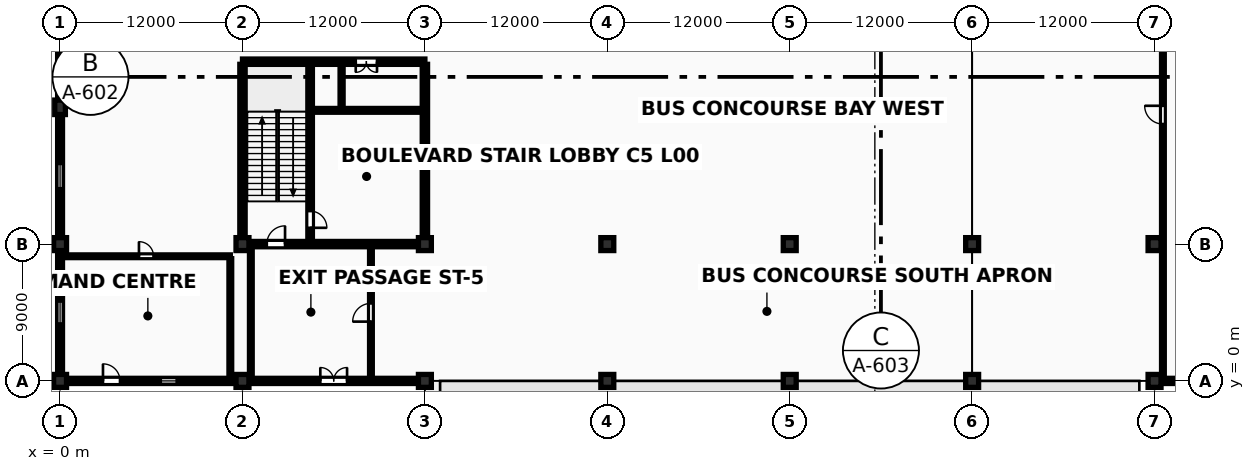
"""IFC4 building model, lengths in metres.
Left out: names, types, materials, properties, quantities, classifications, styles, units other than length and angle.
Written with IfcOpenShell. Run it as: python <this file> out.ifc"""

import sys

from ifc_helpers import new_model, si_unit, direction, frame, frame_2d, origin, origin_2d, place, context, subcontext, project, spatial, rectangle, circle, extrude, element, fill, save


model = new_model("IFC4")
c1 = context("Model", 3, precision=1e-05, world=origin(), true_north=direction((0.0, 1.0)))
c2 = subcontext(c1, "Body", "Model", "MODEL_VIEW")
j1 = project(units=[si_unit("LENGTHUNIT", "METRE"), si_unit("PLANEANGLEUNIT", "RADIAN")], contexts=[c1])
p1 = place(None, origin())
s1 = spatial("IfcSite", under=j1, at=p1, CompositionType="ELEMENT")
p2 = place(p1, origin())
s2 = spatial("IfcBuilding", under=s1, at=p2, CompositionType="ELEMENT")
p3 = place(p2, origin())
s3 = spatial("IfcBuildingStorey", under=s2, at=p3, CompositionType="ELEMENT", Elevation=0.0)
for number, where, z_axis, x_axis in (
    (1, (0.0, 0.0, 0.0), (0.0, 0.0, 1.0), (1.0, 0.0, 0.0)),
    (2, (0.0, 9.0, 0.0), (0.0, 0.0, 1.0), (1.0, 0.0, 0.0)),
):
    element("IfcColumn", number, at=place(p3, frame(where, z_axis=z_axis, x_axis=x_axis)), inside=s3, PredefinedType="COLUMN", context=c2, shape_type="SweptSolid", body=[
        extrude(rectangle(XDim=0.85, YDim=0.85, at=origin_2d()), origin(), (0.0, 0.0, 1.0), 5.4),
    ])
p4 = place(p3, frame((12.0, 0.0, 0.0), z_axis=(0.0, 0.0, 1.0), x_axis=(1.0, 0.0, 0.0)))
e3 = element("IfcColumn", 3, at=p4, inside=s3, PredefinedType="COLUMN", context=c2, shape_type="SweptSolid", body=[
    extrude(circle(Radius=0.425, at=origin_2d()), origin(), (0.0, 0.0, 1.0), 5.4),
])
p5 = place(p3, frame((12.0, 9.0, 0.0), z_axis=(0.0, 0.0, 1.0), x_axis=(1.0, 0.0, 0.0)))
e4 = element("IfcColumn", 4, at=p5, inside=s3, PredefinedType="COLUMN", context=c2, shape_type="SweptSolid", body=[
    extrude(rectangle(XDim=0.85, YDim=0.85, at=origin_2d()), origin(), (0.0, 0.0, 1.0), 5.4),
])
p6 = place(p3, frame((24.0, 0.0, 0.0), z_axis=(0.0, 0.0, 1.0), x_axis=(1.0, 0.0, 0.0)))
e5 = element("IfcColumn", 5, at=p6, inside=s3, PredefinedType="COLUMN", context=c2, shape_type="SweptSolid", body=[
    extrude(circle(Radius=0.425, at=origin_2d()), origin(), (0.0, 0.0, 1.0), 5.4),
])
p7 = place(p3, frame((24.0, 9.0, 0.0), z_axis=(0.0, 0.0, 1.0), x_axis=(1.0, 0.0, 0.0)))
e6 = element("IfcColumn", 6, at=p7, inside=s3, PredefinedType="COLUMN", context=c2, shape_type="SweptSolid", body=[
    extrude(rectangle(XDim=0.85, YDim=0.85, at=origin_2d()), origin(), (0.0, 0.0, 1.0), 5.4),
])
p8 = place(p3, frame((36.0, 0.0, 0.0), z_axis=(0.0, 0.0, 1.0), x_axis=(1.0, 0.0, 0.0)))
e7 = element("IfcColumn", 7, at=p8, inside=s3, PredefinedType="COLUMN", context=c2, shape_type="SweptSolid", body=[
    extrude(circle(Radius=0.425, at=origin_2d()), origin(), (0.0, 0.0, 1.0), 5.4),
])
p9 = place(p3, frame((36.0, 9.0, 0.0), z_axis=(0.0, 0.0, 1.0), x_axis=(1.0, 0.0, 0.0)))
e8 = element("IfcColumn", 8, at=p9, inside=s3, PredefinedType="COLUMN", context=c2, shape_type="SweptSolid", body=[
    extrude(rectangle(XDim=0.85, YDim=0.85, at=origin_2d()), origin(), (0.0, 0.0, 1.0), 5.4),
])
p10 = place(p3, frame((48.0, 0.0, 0.0), z_axis=(0.0, 0.0, 1.0), x_axis=(1.0, 0.0, 0.0)))
e9 = element("IfcColumn", 9, at=p10, inside=s3, PredefinedType="COLUMN", context=c2, shape_type="SweptSolid", body=[
    extrude(circle(Radius=0.425, at=origin_2d()), origin(), (0.0, 0.0, 1.0), 5.4),
])
p11 = place(p3, frame((48.0, 9.0, 0.0), z_axis=(0.0, 0.0, 1.0), x_axis=(1.0, 0.0, 0.0)))
e10 = element("IfcColumn", 10, at=p11, inside=s3, PredefinedType="COLUMN", context=c2, shape_type="SweptSolid", body=[
    extrude(rectangle(XDim=0.85, YDim=0.85, at=origin_2d()), origin(), (0.0, 0.0, 1.0), 5.4),
])
p12 = place(p3, frame((60.0, 0.0, 0.0), z_axis=(0.0, 0.0, 1.0), x_axis=(1.0, 0.0, 0.0)))
e11 = element("IfcColumn", 11, at=p12, inside=s3, PredefinedType="COLUMN", context=c2, shape_type="SweptSolid", body=[
    extrude(circle(Radius=0.425, at=origin_2d()), origin(), (0.0, 0.0, 1.0), 5.4),
])
p13 = place(p3, frame((60.0, 9.0, 0.0), z_axis=(0.0, 0.0, 1.0), x_axis=(1.0, 0.0, 0.0)))
e12 = element("IfcColumn", 12, at=p13, inside=s3, PredefinedType="COLUMN", context=c2, shape_type="SweptSolid", body=[
    extrude(rectangle(XDim=0.85, YDim=0.85, at=origin_2d()), origin(), (0.0, 0.0, 1.0), 5.4),
])
p14 = place(p3, frame((72.0, 0.0, 0.0), z_axis=(0.0, 0.0, 1.0), x_axis=(1.0, 0.0, 0.0)))
e13 = element("IfcColumn", 13, at=p14, inside=s3, PredefinedType="COLUMN", context=c2, shape_type="SweptSolid", body=[
    extrude(circle(Radius=0.425, at=origin_2d()), origin(), (0.0, 0.0, 1.0), 5.4),
])
p15 = place(p3, frame((72.0, 9.0, 0.0), z_axis=(0.0, 0.0, 1.0), x_axis=(1.0, 0.0, 0.0)))
e14 = element("IfcColumn", 14, at=p15, inside=s3, PredefinedType="COLUMN", context=c2, shape_type="SweptSolid", body=[
    extrude(rectangle(XDim=0.85, YDim=0.85, at=origin_2d()), origin(), (0.0, 0.0, 1.0), 5.4),
])
p16 = place(p3, frame((0.0, 18.0, 0.0), z_axis=(0.0, 0.0, 1.0), x_axis=(1.0, 0.0, 0.0)))
e15 = element("IfcColumn", 15, at=p16, inside=s3, PredefinedType="PILASTER", context=c2, shape_type="SweptSolid", body=[
    extrude(rectangle(XDim=0.7, YDim=0.95, at=origin_2d()), origin(), (0.0, 0.0, 1.0), 5.4),
])
p17 = place(p3, frame((12.422, 9.0, 0.0), z_axis=(0.0, 0.0, 1.0), x_axis=(1.0, 0.0, 0.0)))
e16 = element("IfcWall", 16, at=p17, inside=s3, PredefinedType="SHEAR", context=c2, shape_type="SweptSolid", body=[
    extrude(rectangle(XDim=11.156, YDim=0.35, at=frame_2d((5.578, 0.0))), origin(), (0.0, 0.0, 1.0), 5.203),
])
p18 = place(p17, frame((1.178, 0.0, 0.0)))
e17 = element("IfcOpeningElement", 17, at=p18, cuts=e16, PredefinedType="OPENING", context=c2, shape_type="SweptSolid", body=[
    extrude(rectangle(XDim=1.2, YDim=2.2, at=frame_2d((0.6, 1.1))), frame((0.0, 0.19, 0.0), z_axis=(0.0, -1.0, 0.0), x_axis=(1.0, 0.0, 0.0)), (0.0, 0.0, 1.0), 0.38),
])
p19 = place(p3, frame((12.0, 21.0, 0.0), z_axis=(0.0, 0.0, 1.0), x_axis=(1.0, 0.0, 0.0)))
e18 = element("IfcWall", 18, at=p19, inside=s3, PredefinedType="SHEAR", context=c2, shape_type="SweptSolid", body=[
    extrude(rectangle(XDim=12.0, YDim=0.35, at=frame_2d((6.0, 0.0))), origin(), (0.0, 0.0, 1.0), 5.203),
])
p20 = place(p19, frame((7.45, 0.0, 0.0)))
e19 = element("IfcOpeningElement", 19, at=p20, cuts=e18, PredefinedType="OPENING", context=c2, shape_type="SweptSolid", body=[
    extrude(rectangle(XDim=1.4, YDim=2.22, at=frame_2d((0.7, 1.11))), frame((0.0, 0.19, 0.0), z_axis=(0.0, -1.0, 0.0), x_axis=(1.0, 0.0, 0.0)), (0.0, 0.0, 1.0), 0.38),
])
for number, where, z_axis, x_axis in (
    (20, (12.0, 9.422, 0.0), (0.0, 0.0, 1.0), (0.0, 1.0, 0.0)),
    (21, (24.0, 9.422, 0.0), (0.0, 0.0, 1.0), (0.0, 1.0, 0.0)),
):
    element("IfcWall", number, at=place(p3, frame(where, z_axis=z_axis, x_axis=x_axis)), inside=s3, PredefinedType="SHEAR", context=c2, shape_type="SweptSolid", body=[
        extrude(rectangle(XDim=11.406, YDim=0.35, at=frame_2d((5.703, 0.0))), origin(), (0.0, 0.0, 1.0), 5.203),
    ])
p21 = place(p3, frame((16.45, 9.172, 0.0), z_axis=(0.0, 0.0, 1.0), x_axis=(0.0, 1.0, 0.0)))
e22 = element("IfcWall", 22, at=p21, inside=s3, PredefinedType="SHEAR", context=c2, shape_type="SweptSolid", body=[
    extrude(rectangle(XDim=11.656, YDim=0.3, at=frame_2d((5.828, 0.0))), origin(), (0.0, 0.0, 1.0), 5.203),
])
p22 = place(p21, frame((0.9, 0.0, 0.0)))
e23 = element("IfcOpeningElement", 23, at=p22, cuts=e22, PredefinedType="OPENING", context=c2, shape_type="SweptSolid", body=[
    extrude(rectangle(XDim=1.1, YDim=2.2, at=frame_2d((0.55, 1.1))), frame((0.0, 0.165, 0.0), z_axis=(0.0, -1.0, 0.0), x_axis=(1.0, 0.0, 0.0)), (0.0, 0.0, 1.0), 0.33),
])
p23 = place(p3, frame((16.597, 17.8, 0.0), z_axis=(0.0, 0.0, 1.0), x_axis=(1.0, 0.0, 0.0)))
e24 = element("IfcWall", 24, at=p23, inside=s3, PredefinedType="SOLIDWALL", context=c2, shape_type="SweptSolid", body=[
    extrude(rectangle(XDim=7.231, YDim=0.25, at=frame_2d((3.615, 0.0))), origin(), (0.0, 0.0, 1.0), 5.203),
])
p24 = place(p3, frame((18.52, 17.92, 0.0), z_axis=(0.0, 0.0, 1.0), x_axis=(0.0, 1.0, 0.0)))
e25 = element("IfcWall", 25, at=p24, inside=s3, PredefinedType="SOLIDWALL", context=c2, shape_type="SweptSolid", body=[
    extrude(rectangle(XDim=2.905, YDim=0.2, at=frame_2d((1.453, 0.0))), origin(), (0.0, 0.0, 1.0), 5.193),
])
p25 = place(p3, frame((0.423, 0.0, 0.0), z_axis=(0.0, 0.0, 1.0), x_axis=(1.0, 0.0, 0.0)))
e26 = element("IfcWall", 26, at=p25, inside=s3, PredefinedType="SOLIDWALL", context=c2, shape_type="SweptSolid", body=[
    extrude(rectangle(XDim=11.154, YDim=0.34, at=frame_2d((5.577, 0.0))), origin(), (0.0, 0.0, 1.0), 3.85),
])
p26 = place(p25, frame((2.4, 0.0, 0.0)))
e27 = element("IfcOpeningElement", 27, at=p26, cuts=e26, PredefinedType="OPENING", context=c2, shape_type="SweptSolid", body=[
    extrude(rectangle(XDim=1.12, YDim=2.18, at=frame_2d((0.56, 1.09))), frame((0.0, 0.185, 0.0), z_axis=(0.0, -1.0, 0.0), x_axis=(1.0, 0.0, 0.0)), (0.0, 0.0, 1.0), 0.37),
])
p27 = place(p25, frame((6.2, 0.0, 0.95)))
e28 = element("IfcOpeningElement", 28, at=p27, cuts=e26, PredefinedType="OPENING", context=c2, shape_type="SweptSolid", body=[
    extrude(rectangle(XDim=1.05, YDim=1.25, at=frame_2d((0.525, 0.625))), frame((0.0, 0.185, 0.0), z_axis=(0.0, -1.0, 0.0), x_axis=(1.0, 0.0, 0.0)), (0.0, 0.0, 1.0), 0.37),
])
p28 = place(p3, frame((12.423, 0.0, 0.0), z_axis=(0.0, 0.0, 1.0), x_axis=(1.0, 0.0, 0.0)))
e29 = element("IfcWall", 29, at=p28, inside=s3, PredefinedType="SOLIDWALL", context=c2, shape_type="SweptSolid", body=[
    extrude(rectangle(XDim=11.154, YDim=0.34, at=frame_2d((5.577, 0.0))), origin(), (0.0, 0.0, 1.0), 3.85),
])
p29 = place(p28, frame((4.697, 0.0, 0.0)))
e30 = element("IfcOpeningElement", 30, at=p29, cuts=e29, PredefinedType="OPENING", context=c2, shape_type="SweptSolid", body=[
    extrude(rectangle(XDim=1.76, YDim=2.36, at=frame_2d((0.88, 1.18))), frame((0.0, 0.185, 0.0), z_axis=(0.0, -1.0, 0.0), x_axis=(1.0, 0.0, 0.0)), (0.0, 0.0, 1.0), 0.37),
])
p30 = place(p3, frame((72.423, 0.0, 0.0), z_axis=(0.0, 0.0, 1.0), x_axis=(1.0, 0.0, 0.0)))
e31 = element("IfcWall", 31, at=p30, inside=s3, PredefinedType="SOLIDWALL", context=c2, shape_type="SweptSolid", body=[
    extrude(rectangle(XDim=11.154, YDim=0.34, at=frame_2d((5.577, 0.0))), origin(), (0.0, 0.0, 1.0), 3.85),
])
p31 = place(p30, frame((4.697, 0.0, 0.0)))
e32 = element("IfcOpeningElement", 32, at=p31, cuts=e31, PredefinedType="OPENING", context=c2, shape_type="SweptSolid", body=[
    extrude(rectangle(XDim=1.76, YDim=2.36, at=frame_2d((0.88, 1.18))), frame((0.0, 0.185, 0.0), z_axis=(0.0, -1.0, 0.0), x_axis=(1.0, 0.0, 0.0)), (0.0, 0.0, 1.0), 0.37),
])
p32 = place(p3, frame((0.0, 0.423, 0.0), z_axis=(0.0, 0.0, 1.0), x_axis=(0.0, 1.0, 0.0)))
e33 = element("IfcWall", 33, at=p32, inside=s3, PredefinedType="SOLIDWALL", context=c2, shape_type="SweptSolid", body=[
    extrude(rectangle(XDim=8.154, YDim=0.32, at=frame_2d((4.077, 0.0))), origin(), (0.0, 0.0, 1.0), 3.85),
])
p33 = place(p32, frame((3.352, 0.0, 0.55)))
e34 = element("IfcOpeningElement", 34, at=p33, cuts=e33, PredefinedType="OPENING", context=c2, shape_type="SweptSolid", body=[
    extrude(rectangle(XDim=1.45, YDim=1.25, at=frame_2d((0.725, 0.625))), frame((0.0, 0.175, 0.0), z_axis=(0.0, -1.0, 0.0), x_axis=(1.0, 0.0, 0.0)), (0.0, 0.0, 1.0), 0.35),
])
p34 = place(p3, frame((0.0, 9.423, 0.0), z_axis=(0.0, 0.0, 1.0), x_axis=(0.0, 1.0, 0.0)))
e35 = element("IfcWall", 35, at=p34, inside=s3, PredefinedType="SOLIDWALL", context=c2, shape_type="SweptSolid", body=[
    extrude(rectangle(XDim=8.104, YDim=0.32, at=frame_2d((4.052, 0.0))), origin(), (0.0, 0.0, 1.0), 3.85),
])
p35 = place(p34, frame((3.252, 0.0, 0.55)))
e36 = element("IfcOpeningElement", 36, at=p35, cuts=e35, PredefinedType="OPENING", context=c2, shape_type="SweptSolid", body=[
    extrude(rectangle(XDim=1.6, YDim=1.25, at=frame_2d((0.8, 0.625))), frame((0.0, 0.175, 0.0), z_axis=(0.0, -1.0, 0.0), x_axis=(1.0, 0.0, 0.0)), (0.0, 0.0, 1.0), 0.35),
])
p36 = place(p3, frame((0.0, 18.473, 0.0), z_axis=(0.0, 0.0, 1.0), x_axis=(0.0, 1.0, 0.0)))
e37 = element("IfcWall", 37, at=p36, inside=s3, PredefinedType="SOLIDWALL", context=c2, shape_type="SweptSolid", body=[
    extrude(rectangle(XDim=8.104, YDim=0.32, at=frame_2d((4.052, 0.0))), origin(), (0.0, 0.0, 1.0), 3.85),
])
p37 = place(p36, frame((3.177, 0.0, 0.55)))
e38 = element("IfcOpeningElement", 38, at=p37, cuts=e37, PredefinedType="OPENING", context=c2, shape_type="SweptSolid", body=[
    extrude(rectangle(XDim=1.75, YDim=1.25, at=frame_2d((0.875, 0.625))), frame((0.0, 0.175, 0.0), z_axis=(0.0, -1.0, 0.0), x_axis=(1.0, 0.0, 0.0)), (0.0, 0.0, 1.0), 0.35),
])
p38 = place(p3, frame((0.14, 8.2, 0.0), z_axis=(0.0, 0.0, 1.0), x_axis=(1.0, 0.0, 0.0)))
e39 = element("IfcWall", 39, at=p38, inside=s3, PredefinedType="SOLIDWALL", context=c2, shape_type="SweptSolid", body=[
    extrude(rectangle(XDim=11.06, YDim=0.18, at=frame_2d((5.53, 0.0))), origin(), (0.0, 0.0, 1.0), 2.75),
])
p39 = place(p38, frame((5.05, 0.0, 0.0)))
e40 = element("IfcOpeningElement", 40, at=p39, cuts=e39, PredefinedType="OPENING", context=c2, shape_type="SweptSolid", body=[
    extrude(rectangle(XDim=0.96, YDim=2.12, at=frame_2d((0.48, 1.06))), frame((0.0, 0.105, 0.0), z_axis=(0.0, -1.0, 0.0), x_axis=(1.0, 0.0, 0.0)), (0.0, 0.0, 1.0), 0.21),
])
p40 = place(p3, frame((11.2, 0.14, 0.0), z_axis=(0.0, 0.0, 1.0), x_axis=(0.0, 1.0, 0.0)))
e41 = element("IfcWall", 41, at=p40, inside=s3, PredefinedType="SOLIDWALL", context=c2, shape_type="SweptSolid", body=[
    extrude(rectangle(XDim=7.9, YDim=0.18, at=frame_2d((3.95, 0.0))), origin(), (0.0, 0.0, 1.0), 2.75),
])
p41 = place(p3, frame((72.55, 0.4, 0.0), z_axis=(0.0, 0.0, 1.0), x_axis=(0.0, 1.0, 0.0)))
e42 = element("IfcWall", 42, at=p41, inside=s3, PredefinedType="SOLIDWALL", context=c2, shape_type="SweptSolid", body=[
    extrude(rectangle(XDim=26.3, YDim=0.18, at=frame_2d((13.15, 0.0))), origin(), (0.0, 0.0, 1.0), 2.6),
])
p42 = place(p41, frame((16.5, 0.0, 0.0)))
e43 = element("IfcOpeningElement", 43, at=p42, cuts=e42, PredefinedType="OPENING", context=c2, shape_type="SweptSolid", body=[
    extrude(rectangle(XDim=1.2, YDim=2.2, at=frame_2d((0.6, 1.1))), frame((0.0, 0.105, 0.0), z_axis=(0.0, -1.0, 0.0), x_axis=(1.0, 0.0, 0.0)), (0.0, 0.0, 1.0), 0.21),
])
p43 = place(p3, frame((12.55, 0.4, 0.0), z_axis=(0.0, 0.0, 1.0), x_axis=(0.0, 1.0, 0.0)))
e44 = element("IfcWall", 44, at=p43, inside=s3, PredefinedType="SOLIDWALL", context=c2, shape_type="SweptSolid", body=[
    extrude(rectangle(XDim=8.3, YDim=0.18, at=frame_2d((4.15, 0.0))), origin(), (0.0, 0.0, 1.0), 2.6),
])
p44 = place(p3, frame((20.45, 0.4, 0.0), z_axis=(0.0, 0.0, 1.0), x_axis=(0.0, 1.0, 0.0)))
e45 = element("IfcWall", 45, at=p44, inside=s3, PredefinedType="SOLIDWALL", context=c2, shape_type="SweptSolid", body=[
    extrude(rectangle(XDim=8.3, YDim=0.18, at=frame_2d((4.15, 0.0))), origin(), (0.0, 0.0, 1.0), 2.6),
])
p45 = place(p44, frame((3.5, 0.0, 0.0)))
e46 = element("IfcOpeningElement", 46, at=p45, cuts=e45, PredefinedType="OPENING", context=c2, shape_type="SweptSolid", body=[
    extrude(rectangle(XDim=1.2, YDim=2.2, at=frame_2d((0.6, 1.1))), frame((0.0, 0.105, 0.0), z_axis=(0.0, -1.0, 0.0), x_axis=(1.0, 0.0, 0.0)), (0.0, 0.0, 1.0), 0.21),
])
p46 = place(p26, frame((1.12, 0.0, 0.0), z_axis=(0.0, 0.0, 1.0), x_axis=(-1.0, 0.0, 0.0)))
e47 = element("IfcDoor", 47, at=p46, inside=s3, OperationType="SINGLE_SWING_LEFT", PredefinedType="DOOR", context=c2, shape_type="SweptSolid", body=[
    extrude(rectangle(XDim=1.12, YDim=2.18, at=frame_2d((0.56, 1.09))), frame((0.0, 0.025, 0.0), z_axis=(0.0, -1.0, 0.0), x_axis=(1.0, 0.0, 0.0)), (0.0, 0.0, 1.0), 0.05),
])
fill(e27, e47)
p47 = place(p27, origin())
e48 = element("IfcWindow", 48, at=p47, inside=s3, PartitioningType="SINGLE_PANEL", PredefinedType="WINDOW", context=c2, shape_type="SweptSolid", body=[
    extrude(rectangle(XDim=1.05, YDim=1.25, at=frame_2d((0.525, 0.625))), frame((0.0, 0.03, 0.0), z_axis=(0.0, -1.0, 0.0), x_axis=(1.0, 0.0, 0.0)), (0.0, 0.0, 1.0), 0.06),
])
fill(e28, e48)
p48 = place(p29, frame((1.76, 0.0, 0.0), z_axis=(0.0, 0.0, 1.0), x_axis=(-1.0, 0.0, 0.0)))
e49 = element("IfcDoor", 49, at=p48, inside=s3, OperationType="DOUBLE_DOOR_SINGLE_SWING", PredefinedType="DOOR", context=c2, shape_type="SweptSolid", body=[
    extrude(rectangle(XDim=1.76, YDim=2.36, at=frame_2d((0.88, 1.18))), frame((0.0, 0.025, 0.0), z_axis=(0.0, -1.0, 0.0), x_axis=(1.0, 0.0, 0.0)), (0.0, 0.0, 1.0), 0.05),
])
fill(e30, e49)
p49 = place(p33, origin())
e50 = element("IfcWindow", 50, at=p49, inside=s3, PartitioningType="SINGLE_PANEL", PredefinedType="WINDOW", context=c2, shape_type="SweptSolid", body=[
    extrude(rectangle(XDim=1.45, YDim=1.25, at=frame_2d((0.725, 0.625))), frame((0.0, 0.03, 0.0), z_axis=(0.0, -1.0, 0.0), x_axis=(1.0, 0.0, 0.0)), (0.0, 0.0, 1.0), 0.06),
])
fill(e34, e50)
p50 = place(p35, origin())
e51 = element("IfcWindow", 51, at=p50, inside=s3, PartitioningType="SINGLE_PANEL", PredefinedType="WINDOW", context=c2, shape_type="SweptSolid", body=[
    extrude(rectangle(XDim=1.6, YDim=1.25, at=frame_2d((0.8, 0.625))), frame((0.0, 0.03, 0.0), z_axis=(0.0, -1.0, 0.0), x_axis=(1.0, 0.0, 0.0)), (0.0, 0.0, 1.0), 0.06),
])
fill(e36, e51)
p51 = place(p22, origin())
e52 = element("IfcDoor", 52, at=p51, inside=s3, OperationType="SINGLE_SWING_LEFT", PredefinedType="DOOR", context=c2, shape_type="SweptSolid", body=[
    extrude(rectangle(XDim=1.1, YDim=2.2, at=frame_2d((0.55, 1.1))), frame((0.0, 0.025, 0.0), z_axis=(0.0, -1.0, 0.0), x_axis=(1.0, 0.0, 0.0)), (0.0, 0.0, 1.0), 0.05),
])
fill(e23, e52)
p52 = place(p20, origin())
e53 = element("IfcDoor", 53, at=p52, inside=s3, OperationType="DOUBLE_DOOR_SINGLE_SWING", PredefinedType="DOOR", context=c2, shape_type="SweptSolid", body=[
    extrude(rectangle(XDim=1.4, YDim=2.22, at=frame_2d((0.7, 1.11))), frame((0.0, 0.025, 0.0), z_axis=(0.0, -1.0, 0.0), x_axis=(1.0, 0.0, 0.0)), (0.0, 0.0, 1.0), 0.05),
])
fill(e19, e53)
p53 = place(p18, frame((1.2, 0.0, 0.0), z_axis=(0.0, 0.0, 1.0), x_axis=(-1.0, 0.0, 0.0)))
e54 = element("IfcDoor", 54, at=p53, inside=s3, OperationType="SINGLE_SWING_RIGHT", PredefinedType="DOOR", context=c2, shape_type="SweptSolid", body=[
    extrude(rectangle(XDim=1.2, YDim=2.2, at=frame_2d((0.6, 1.1))), frame((0.0, 0.025, 0.0), z_axis=(0.0, -1.0, 0.0), x_axis=(1.0, 0.0, 0.0)), (0.0, 0.0, 1.0), 0.05),
])
fill(e17, e54)
p54 = place(p39, origin())
e55 = element("IfcDoor", 55, at=p54, inside=s3, OperationType="SINGLE_SWING_LEFT", PredefinedType="DOOR", context=c2, shape_type="SweptSolid", body=[
    extrude(rectangle(XDim=0.96, YDim=2.12, at=frame_2d((0.48, 1.06))), frame((0.0, 0.025, 0.0), z_axis=(0.0, -1.0, 0.0), x_axis=(1.0, 0.0, 0.0)), (0.0, 0.0, 1.0), 0.05),
])
fill(e40, e55)
p55 = place(p42, frame((1.2, 0.0, 0.0), z_axis=(0.0, 0.0, 1.0), x_axis=(-1.0, 0.0, 0.0)))
e56 = element("IfcDoor", 56, at=p55, inside=s3, OperationType="SINGLE_SWING_RIGHT", PredefinedType="DOOR", context=c2, shape_type="SweptSolid", body=[
    extrude(rectangle(XDim=1.2, YDim=2.2, at=frame_2d((0.6, 1.1))), frame((0.0, 0.025, 0.0), z_axis=(0.0, -1.0, 0.0), x_axis=(1.0, 0.0, 0.0)), (0.0, 0.0, 1.0), 0.05),
])
fill(e43, e56)
p56 = place(p45, frame((1.2, 0.0, 0.0), z_axis=(0.0, 0.0, 1.0), x_axis=(-1.0, 0.0, 0.0)))
e57 = element("IfcDoor", 57, at=p56, inside=s3, OperationType="SINGLE_SWING_LEFT", PredefinedType="DOOR", context=c2, shape_type="SweptSolid", body=[
    extrude(rectangle(XDim=1.2, YDim=2.2, at=frame_2d((0.6, 1.1))), frame((0.0, 0.025, 0.0), z_axis=(0.0, -1.0, 0.0), x_axis=(1.0, 0.0, 0.0)), (0.0, 0.0, 1.0), 0.05),
])
fill(e46, e57)
save(model, sys.argv[1])
